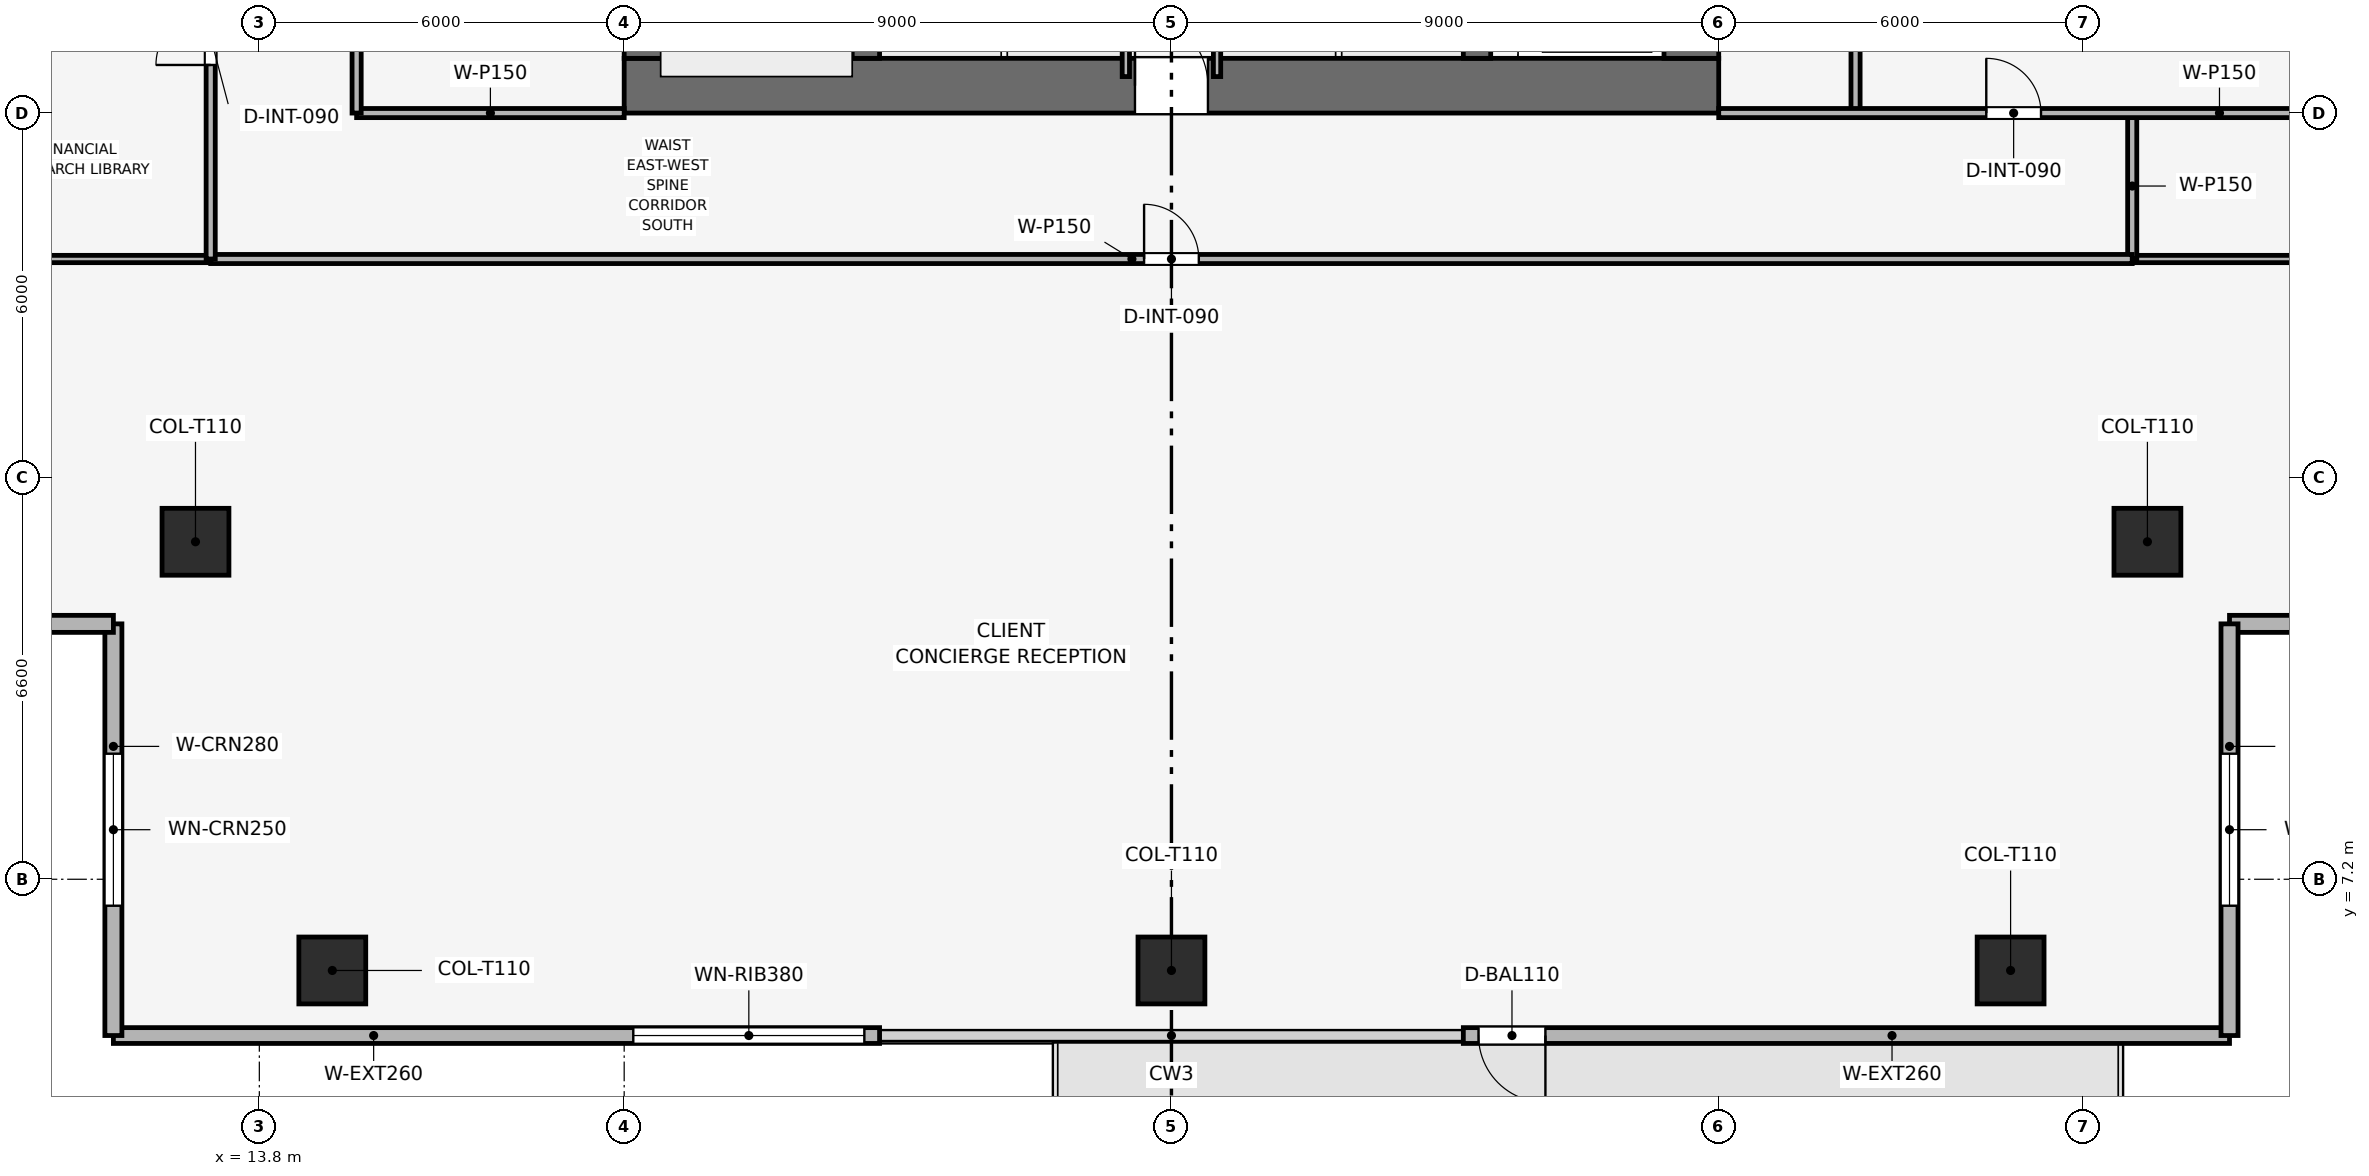
"""IFC4 building model, lengths in metres.
Left out: names, types, materials, properties, quantities, classifications, styles, units other than length and angle.
Written with IfcOpenShell. Run it as: python <this file> out.ifc"""

import sys

from ifc_helpers import new_model, si_unit, direction, frame, frame_2d, origin, origin_2d, place, context, subcontext, project, spatial, rectangle, extrude, element, fill, save


model = new_model("IFC4")
c1 = context("Model", 3, precision=1e-05, world=origin(), true_north=direction((0.0, 1.0)))
c2 = subcontext(c1, "Body", "Model", "MODEL_VIEW")
j1 = project(units=[si_unit("LENGTHUNIT", "METRE"), si_unit("PLANEANGLEUNIT", "RADIAN")], contexts=[c1])
p1 = place(None, origin())
s1 = spatial("IfcSite", under=j1, at=p1, CompositionType="ELEMENT")
p2 = place(p1, origin())
s2 = spatial("IfcBuilding", under=s1, at=p2, CompositionType="ELEMENT")
p3 = place(p2, frame((0.0, 0.0, 153.3)))
s3 = spatial("IfcBuildingStorey", under=s2, at=p3, CompositionType="ELEMENT", Elevation=153.3)
p4 = place(p3, frame((19.8, 20.25, 0.0), z_axis=(0.0, 0.0, 1.0), x_axis=(1.0, 0.0, 0.0)))
e1 = element("IfcWall", 1, at=p4, inside=s3, PredefinedType="SHEAR", context=c2, shape_type="SweptSolid", body=[
    extrude(rectangle(XDim=18.0, YDim=0.9, at=frame_2d((9.0, 0.0))), origin(), (0.0, 0.0, 1.0), 3.75),
])
p5 = place(p4, frame((8.4, 0.0, 0.0)))
e2 = element("IfcOpeningElement", 2, at=p5, cuts=e1, PredefinedType="OPENING", context=c2, shape_type="SweptSolid", body=[
    extrude(rectangle(XDim=1.2, YDim=2.2, at=frame_2d((0.6, 1.1))), frame((0.0, 0.46, 0.0), z_axis=(0.0, -1.0, 0.0), x_axis=(1.0, 0.0, 0.0)), (0.0, 0.0, 1.0), 0.92),
])
p6 = place(p3, frame((20.25, 20.7, 0.0), z_axis=(0.0, 0.0, 1.0), x_axis=(0.0, 1.0, 0.0)))
e3 = element("IfcWall", 3, at=p6, inside=s3, PredefinedType="SHEAR", context=c2, shape_type="SweptSolid", body=[
    extrude(rectangle(XDim=16.2, YDim=0.9, at=frame_2d((8.1, 0.0))), origin(), (0.0, 0.0, 1.0), 3.75),
])
p7 = place(p6, frame((10.1, 0.0, 0.0)))
e4 = element("IfcOpeningElement", 4, at=p7, cuts=e3, PredefinedType="OPENING", context=c2, shape_type="SweptSolid", body=[
    extrude(rectangle(XDim=1.1, YDim=2.15, at=frame_2d((0.55, 1.075))), frame((0.0, 0.46, 0.0), z_axis=(0.0, -1.0, 0.0), x_axis=(1.0, 0.0, 0.0)), (0.0, 0.0, 1.0), 0.92),
])
p8 = place(p3, frame((37.35, 20.7, 0.0), z_axis=(0.0, 0.0, 1.0), x_axis=(0.0, 1.0, 0.0)))
e5 = element("IfcWall", 5, at=p8, inside=s3, PredefinedType="SHEAR", context=c2, shape_type="SweptSolid", body=[
    extrude(rectangle(XDim=16.2, YDim=0.9, at=frame_2d((8.1, 0.0))), origin(), (0.0, 0.0, 1.0), 3.75),
])
p9 = place(p8, frame((4.6, 0.0, 0.0)))
e6 = element("IfcOpeningElement", 6, at=p9, cuts=e5, PredefinedType="OPENING", context=c2, shape_type="SweptSolid", body=[
    extrude(rectangle(XDim=1.1, YDim=2.15, at=frame_2d((0.55, 1.075))), frame((0.0, 0.46, 0.0), z_axis=(0.0, -1.0, 0.0), x_axis=(1.0, 0.0, 0.0)), (0.0, 0.0, 1.0), 0.92),
])
for number, where, z_axis, x_axis in (
    (7, (23.775, 20.7, 0.0), (0.0, 0.0, 1.0), (0.0, 1.0, 0.0)),
    (8, (33.825, 20.7, 0.0), (0.0, 0.0, 1.0), (0.0, 1.0, 0.0)),
):
    element("IfcWall", number, at=place(p3, frame(where, z_axis=z_axis, x_axis=x_axis)), inside=s3, PredefinedType="SHEAR", context=c2, shape_type="SweptSolid", body=[
        extrude(rectangle(XDim=16.2, YDim=0.45, at=frame_2d((8.1, 0.0))), origin(), (0.0, 0.0, 1.0), 3.75),
    ])
for number, where, z_axis, x_axis in (
    (9, (15.0, 5.7, 0.003), (0.0, 0.0, 1.0), (1.0, 0.0, 0.0)),
    (10, (28.8, 5.7, 0.003), (0.0, 0.0, 1.0), (1.0, 0.0, 0.0)),
    (11, (42.6, 5.7, 0.003), (0.0, 0.0, 1.0), (1.0, 0.0, 0.0)),
    (12, (12.75, 12.75, 0.003), (0.0, 0.0, 1.0), (1.0, 0.0, 0.0)),
    (13, (44.85, 12.75, 0.003), (0.0, 0.0, 1.0), (1.0, 0.0, 0.0)),
):
    element("IfcColumn", number, at=place(p3, frame(where, z_axis=z_axis, x_axis=x_axis)), inside=s3, PredefinedType="COLUMN", context=c2, shape_type="SweptSolid", body=[
        extrude(rectangle(XDim=1.1, YDim=1.1, at=origin_2d()), origin(), (0.0, 0.0, 1.0), 3.489),
    ])
p10 = place(p3, frame((46.2, 4.63, 0.0), z_axis=(0.0, 0.0, 1.0), x_axis=(-1.0, 0.0, 0.0)))
e14 = element("IfcWall", 14, at=p10, inside=s3, PredefinedType="SOLIDWALL", context=c2, shape_type="SweptSolid", body=[
    extrude(rectangle(XDim=12.6, YDim=0.26, at=frame_2d((6.3, 0.0))), origin(), (0.0, 0.0, 1.0), 3.495),
])
p11 = place(p10, frame((11.25, 0.0, 0.0)))
e15 = element("IfcOpeningElement", 15, at=p11, cuts=e14, PredefinedType="OPENING", context=c2, shape_type="SweptSolid", body=[
    extrude(rectangle(XDim=1.1, YDim=2.2, at=frame_2d((0.55, 1.1))), frame((0.0, 0.14, 0.0), z_axis=(0.0, -1.0, 0.0), x_axis=(1.0, 0.0, 0.0)), (0.0, 0.0, 1.0), 0.28),
])
p12 = place(p3, frame((24.0, 4.63, 0.0), z_axis=(0.0, 0.0, 1.0), x_axis=(-1.0, 0.0, 0.0)))
e16 = element("IfcWall", 16, at=p12, inside=s3, PredefinedType="SOLIDWALL", context=c2, shape_type="SweptSolid", body=[
    extrude(rectangle(XDim=12.6, YDim=0.26, at=frame_2d((6.3, 0.0))), origin(), (0.0, 0.0, 1.0), 3.495),
])
p13 = place(p12, frame((0.25, 0.0, 0.9)))
e17 = element("IfcOpeningElement", 17, at=p13, cuts=e16, PredefinedType="OPENING", context=c2, shape_type="SweptSolid", body=[
    extrude(rectangle(XDim=3.8, YDim=1.9, at=frame_2d((1.9, 0.95))), frame((0.0, 0.14, 0.0), z_axis=(0.0, -1.0, 0.0), x_axis=(1.0, 0.0, 0.0)), (0.0, 0.0, 1.0), 0.28),
])
p14 = place(p3, frame((11.4, 4.63, 0.0), z_axis=(0.0, 0.0, 1.0), x_axis=(0.0, 1.0, 0.0)))
e18 = element("IfcWall", 18, at=p14, inside=s3, PredefinedType="SOLIDWALL", context=c2, shape_type="SweptSolid", body=[
    extrude(rectangle(XDim=6.77, YDim=0.28, at=frame_2d((3.385, 0.0))), origin(), (0.0, 0.0, 1.0), 3.495),
])
p15 = place(p14, frame((2.135, 0.0, 0.9)))
e19 = element("IfcOpeningElement", 19, at=p15, cuts=e18, PredefinedType="OPENING", context=c2, shape_type="SweptSolid", body=[
    extrude(rectangle(XDim=2.5, YDim=1.9, at=frame_2d((1.25, 0.95))), frame((0.0, 0.15, 0.0), z_axis=(0.0, -1.0, 0.0), x_axis=(1.0, 0.0, 0.0)), (0.0, 0.0, 1.0), 0.3),
])
p16 = place(p3, frame((11.4, 11.4, 0.0), z_axis=(0.0, 0.0, 1.0), x_axis=(-1.0, 0.0, 0.0)))
e20 = element("IfcWall", 20, at=p16, inside=s3, PredefinedType="SOLIDWALL", context=c2, shape_type="SweptSolid", body=[
    extrude(rectangle(XDim=6.77, YDim=0.28, at=frame_2d((3.385, 0.0))), origin(), (0.0, 0.0, 1.0), 3.495),
])
p17 = place(p16, frame((2.135, 0.0, 0.9)))
e21 = element("IfcOpeningElement", 21, at=p17, cuts=e20, PredefinedType="OPENING", context=c2, shape_type="SweptSolid", body=[
    extrude(rectangle(XDim=2.5, YDim=1.9, at=frame_2d((1.25, 0.95))), frame((0.0, 0.15, 0.0), z_axis=(0.0, -1.0, 0.0), x_axis=(1.0, 0.0, 0.0)), (0.0, 0.0, 1.0), 0.3),
])
p18 = place(p3, frame((52.97, 11.4, 0.0), z_axis=(0.0, 0.0, 1.0), x_axis=(-1.0, 0.0, 0.0)))
e22 = element("IfcWall", 22, at=p18, inside=s3, PredefinedType="SOLIDWALL", context=c2, shape_type="SweptSolid", body=[
    extrude(rectangle(XDim=6.77, YDim=0.28, at=frame_2d((3.385, 0.0))), origin(), (0.0, 0.0, 1.0), 3.495),
])
p19 = place(p18, frame((2.135, 0.0, 0.9)))
e23 = element("IfcOpeningElement", 23, at=p19, cuts=e22, PredefinedType="OPENING", context=c2, shape_type="SweptSolid", body=[
    extrude(rectangle(XDim=2.5, YDim=1.9, at=frame_2d((1.25, 0.95))), frame((0.0, 0.15, 0.0), z_axis=(0.0, -1.0, 0.0), x_axis=(1.0, 0.0, 0.0)), (0.0, 0.0, 1.0), 0.3),
])
p20 = place(p3, frame((46.2, 11.4, 0.0), z_axis=(0.0, 0.0, 1.0), x_axis=(0.0, -1.0, 0.0)))
e24 = element("IfcWall", 24, at=p20, inside=s3, PredefinedType="SOLIDWALL", context=c2, shape_type="SweptSolid", body=[
    extrude(rectangle(XDim=6.77, YDim=0.28, at=frame_2d((3.385, 0.0))), origin(), (0.0, 0.0, 1.0), 3.495),
])
p21 = place(p20, frame((2.135, 0.0, 0.9)))
e25 = element("IfcOpeningElement", 25, at=p21, cuts=e24, PredefinedType="OPENING", context=c2, shape_type="SweptSolid", body=[
    extrude(rectangle(XDim=2.5, YDim=1.9, at=frame_2d((1.25, 0.95))), frame((0.0, 0.15, 0.0), z_axis=(0.0, -1.0, 0.0), x_axis=(1.0, 0.0, 0.0)), (0.0, 0.0, 1.0), 0.3),
])
for number, where, z_axis, x_axis in (
    (26, (28.05, 20.4, 0.0), (0.0, 0.0, 1.0), (0.0, 1.0, 0.0)),
    (27, (29.55, 20.4, 0.0), (0.0, 0.0, 1.0), (0.0, 1.0, 0.0)),
):
    element("IfcWall", number, at=place(p3, frame(where, z_axis=z_axis, x_axis=x_axis)), inside=s3, PredefinedType="PARTITIONING", context=c2, shape_type="SweptSolid", body=[
        extrude(rectangle(XDim=2.75, YDim=0.12, at=frame_2d((1.375, 0.0))), origin(), (0.0, 0.0, 1.0), 3.495),
    ])
p22 = place(p3, frame((15.4, 19.8, 0.0), z_axis=(0.0, 0.0, 1.0), x_axis=(1.0, 0.0, 0.0)))
e28 = element("IfcWall", 28, at=p22, inside=s3, PredefinedType="PARTITIONING", context=c2, shape_type="SweptSolid", body=[
    extrude(rectangle(XDim=4.4, YDim=0.15, at=frame_2d((2.2, 0.0))), origin(), (0.0, 0.0, 1.0), 3.03),
])
p23 = place(p3, frame((15.4, 19.8, 0.0), z_axis=(0.0, 0.0, 1.0), x_axis=(0.0, 1.0, 0.0)))
e29 = element("IfcWall", 29, at=p23, inside=s3, PredefinedType="PARTITIONING", context=c2, shape_type="SweptSolid", body=[
    extrude(rectangle(XDim=10.35, YDim=0.15, at=frame_2d((5.175, 0.0))), origin(), (0.0, 0.0, 1.0), 3.03),
])
p24 = place(p23, frame((1.2, 0.0, 0.0)))
e30 = element("IfcOpeningElement", 30, at=p24, cuts=e29, PredefinedType="OPENING", context=c2, shape_type="SweptSolid", body=[
    extrude(rectangle(XDim=0.9, YDim=2.1, at=frame_2d((0.45, 1.05))), frame((0.0, 0.085, 0.0), z_axis=(0.0, -1.0, 0.0), x_axis=(1.0, 0.0, 0.0)), (0.0, 0.0, 1.0), 0.17),
])
p25 = place(p23, frame((4.7, 0.0, 0.0)))
e31 = element("IfcOpeningElement", 31, at=p25, cuts=e29, PredefinedType="OPENING", context=c2, shape_type="SweptSolid", body=[
    extrude(rectangle(XDim=0.9, YDim=2.1, at=frame_2d((0.45, 1.05))), frame((0.0, 0.085, 0.0), z_axis=(0.0, -1.0, 0.0), x_axis=(1.0, 0.0, 0.0)), (0.0, 0.0, 1.0), 0.17),
])
p26 = place(p23, frame((8.1, 0.0, 0.0)))
e32 = element("IfcOpeningElement", 32, at=p26, cuts=e29, PredefinedType="OPENING", context=c2, shape_type="SweptSolid", body=[
    extrude(rectangle(XDim=0.95, YDim=2.1, at=frame_2d((0.475, 1.05))), frame((0.0, 0.085, 0.0), z_axis=(0.0, -1.0, 0.0), x_axis=(1.0, 0.0, 0.0)), (0.0, 0.0, 1.0), 0.17),
])
p27 = place(p3, frame((40.05, 19.8, 0.0), z_axis=(0.0, 0.0, 1.0), x_axis=(0.0, 1.0, 0.0)))
e33 = element("IfcWall", 33, at=p27, inside=s3, PredefinedType="PARTITIONING", context=c2, shape_type="SweptSolid", body=[
    extrude(rectangle(XDim=7.05, YDim=0.15, at=frame_2d((3.525, 0.0))), origin(), (0.0, 0.0, 1.0), 3.03),
])
p28 = place(p3, frame((4.63, 17.4, 0.0), z_axis=(0.0, 0.0, 1.0), x_axis=(1.0, 0.0, 0.0)))
e34 = element("IfcWall", 34, at=p28, inside=s3, PredefinedType="PARTITIONING", context=c2, shape_type="SweptSolid", body=[
    extrude(rectangle(XDim=8.37, YDim=0.12, at=frame_2d((4.185, 0.0))), origin(), (0.0, 0.0, 1.0), 2.98),
])
p29 = place(p3, frame((44.6, 17.4, 0.0), z_axis=(0.0, 0.0, 1.0), x_axis=(1.0, 0.0, 0.0)))
e35 = element("IfcWall", 35, at=p29, inside=s3, PredefinedType="PARTITIONING", context=c2, shape_type="SweptSolid", body=[
    extrude(rectangle(XDim=8.37, YDim=0.12, at=frame_2d((4.185, 0.0))), origin(), (0.0, 0.0, 1.0), 2.98),
])
p30 = place(p3, frame((44.6, 17.4, 0.0), z_axis=(0.0, 0.0, 1.0), x_axis=(0.0, 1.0, 0.0)))
e36 = element("IfcWall", 36, at=p30, inside=s3, PredefinedType="PARTITIONING", context=c2, shape_type="SweptSolid", body=[
    extrude(rectangle(XDim=2.4, YDim=0.15, at=frame_2d((1.2, 0.0))), origin(), (0.0, 0.0, 1.0), 3.495),
])
p31 = place(p3, frame((37.8, 19.8, 0.0), z_axis=(0.0, 0.0, 1.0), x_axis=(1.0, 0.0, 0.0)))
e37 = element("IfcWall", 37, at=p31, inside=s3, PredefinedType="PARTITIONING", context=c2, shape_type="SweptSolid", body=[
    extrude(rectangle(XDim=15.17, YDim=0.15, at=frame_2d((7.585, 0.0))), origin(), (0.0, 0.0, 1.0), 2.98),
])
p32 = place(p31, frame((4.4, 0.0, 0.0)))
e38 = element("IfcOpeningElement", 38, at=p32, cuts=e37, PredefinedType="OPENING", context=c2, shape_type="SweptSolid", body=[
    extrude(rectangle(XDim=0.9, YDim=2.1, at=frame_2d((0.45, 1.05))), frame((0.0, 0.085, 0.0), z_axis=(0.0, -1.0, 0.0), x_axis=(1.0, 0.0, 0.0)), (0.0, 0.0, 1.0), 0.17),
])
p33 = place(p3, frame((13.0, 17.4, 0.0), z_axis=(0.0, 0.0, 1.0), x_axis=(1.0, 0.0, 0.0)))
e39 = element("IfcWall", 39, at=p33, inside=s3, PredefinedType="PARTITIONING", context=c2, shape_type="SweptSolid", body=[
    extrude(rectangle(XDim=31.6, YDim=0.15, at=frame_2d((15.8, 0.0))), origin(), (0.0, 0.0, 1.0), 3.03),
])
p34 = place(p33, frame((15.35, 0.0, 0.0)))
e40 = element("IfcOpeningElement", 40, at=p34, cuts=e39, PredefinedType="OPENING", context=c2, shape_type="SweptSolid", body=[
    extrude(rectangle(XDim=0.9, YDim=2.1, at=frame_2d((0.45, 1.05))), frame((0.0, 0.085, 0.0), z_axis=(0.0, -1.0, 0.0), x_axis=(1.0, 0.0, 0.0)), (0.0, 0.0, 1.0), 0.17),
])
p35 = place(p3, frame((13.0, 17.4, 0.0), z_axis=(0.0, 0.0, 1.0), x_axis=(0.0, 1.0, 0.0)))
e41 = element("IfcWall", 41, at=p35, inside=s3, PredefinedType="PARTITIONING", context=c2, shape_type="SweptSolid", body=[
    extrude(rectangle(XDim=22.8, YDim=0.15, at=frame_2d((11.4, 0.0))), origin(), (0.0, 0.0, 1.0), 3.03),
])
p36 = place(p35, frame((3.191, 0.0, 0.0)))
e42 = element("IfcOpeningElement", 42, at=p36, cuts=e41, PredefinedType="OPENING", context=c2, shape_type="SweptSolid", body=[
    extrude(rectangle(XDim=0.9, YDim=2.1, at=frame_2d((0.45, 1.05))), frame((0.0, 0.085, 0.0), z_axis=(0.0, -1.0, 0.0), x_axis=(1.0, 0.0, 0.0)), (0.0, 0.0, 1.0), 0.17),
])
p37 = place(p35, frame((6.581, 0.0, 0.0)))
e43 = element("IfcOpeningElement", 43, at=p37, cuts=e41, PredefinedType="OPENING", context=c2, shape_type="SweptSolid", body=[
    extrude(rectangle(XDim=0.9, YDim=2.1, at=frame_2d((0.45, 1.05))), frame((0.0, 0.085, 0.0), z_axis=(0.0, -1.0, 0.0), x_axis=(1.0, 0.0, 0.0)), (0.0, 0.0, 1.0), 0.17),
])
p38 = place(p35, frame((10.878, 0.0, 0.0)))
e44 = element("IfcOpeningElement", 44, at=p38, cuts=e41, PredefinedType="OPENING", context=c2, shape_type="SweptSolid", body=[
    extrude(rectangle(XDim=0.9, YDim=2.1, at=frame_2d((0.45, 1.05))), frame((0.0, 0.085, 0.0), z_axis=(0.0, -1.0, 0.0), x_axis=(1.0, 0.0, 0.0)), (0.0, 0.0, 1.0), 0.17),
])
p39 = place(p35, frame((16.488, 0.0, 0.0)))
e45 = element("IfcOpeningElement", 45, at=p39, cuts=e41, PredefinedType="OPENING", context=c2, shape_type="SweptSolid", body=[
    extrude(rectangle(XDim=0.9, YDim=2.1, at=frame_2d((0.45, 1.05))), frame((0.0, 0.085, 0.0), z_axis=(0.0, -1.0, 0.0), x_axis=(1.0, 0.0, 0.0)), (0.0, 0.0, 1.0), 0.17),
])
p40 = place(p11, origin())
e46 = element("IfcDoor", 46, at=p40, inside=s3, OperationType="SINGLE_SWING_LEFT", PredefinedType="DOOR", context=c2, shape_type="SweptSolid", body=[
    extrude(rectangle(XDim=1.1, YDim=2.2, at=frame_2d((0.55, 1.1))), frame((0.0, 0.025, 0.0), z_axis=(0.0, -1.0, 0.0), x_axis=(1.0, 0.0, 0.0)), (0.0, 0.0, 1.0), 0.05),
])
fill(e15, e46)
p41 = place(p13, origin())
e47 = element("IfcWindow", 47, at=p41, inside=s3, PartitioningType="SINGLE_PANEL", PredefinedType="WINDOW", context=c2, shape_type="SweptSolid", body=[
    extrude(rectangle(XDim=3.8, YDim=1.9, at=frame_2d((1.9, 0.95))), frame((0.0, 0.03, 0.0), z_axis=(0.0, -1.0, 0.0), x_axis=(1.0, 0.0, 0.0)), (0.0, 0.0, 1.0), 0.06),
])
fill(e17, e47)
p42 = place(p15, origin())
e48 = element("IfcWindow", 48, at=p42, inside=s3, PartitioningType="SINGLE_PANEL", PredefinedType="WINDOW", context=c2, shape_type="SweptSolid", body=[
    extrude(rectangle(XDim=2.5, YDim=1.9, at=frame_2d((1.25, 0.95))), frame((0.0, 0.03, 0.0), z_axis=(0.0, -1.0, 0.0), x_axis=(1.0, 0.0, 0.0)), (0.0, 0.0, 1.0), 0.06),
])
fill(e19, e48)
p43 = place(p21, origin())
e49 = element("IfcWindow", 49, at=p43, inside=s3, PartitioningType="SINGLE_PANEL", PredefinedType="WINDOW", context=c2, shape_type="SweptSolid", body=[
    extrude(rectangle(XDim=2.5, YDim=1.9, at=frame_2d((1.25, 0.95))), frame((0.0, 0.03, 0.0), z_axis=(0.0, -1.0, 0.0), x_axis=(1.0, 0.0, 0.0)), (0.0, 0.0, 1.0), 0.06),
])
fill(e25, e49)
p44 = place(p32, origin())
e50 = element("IfcDoor", 50, at=p44, inside=s3, OperationType="SINGLE_SWING_LEFT", PredefinedType="DOOR", context=c2, shape_type="SweptSolid", body=[
    extrude(rectangle(XDim=0.9, YDim=2.1, at=frame_2d((0.45, 1.05))), frame((0.0, 0.025, 0.0), z_axis=(0.0, -1.0, 0.0), x_axis=(1.0, 0.0, 0.0)), (0.0, 0.0, 1.0), 0.05),
])
fill(e38, e50)
p45 = place(p34, origin())
e51 = element("IfcDoor", 51, at=p45, inside=s3, OperationType="SINGLE_SWING_LEFT", PredefinedType="DOOR", context=c2, shape_type="SweptSolid", body=[
    extrude(rectangle(XDim=0.9, YDim=2.1, at=frame_2d((0.45, 1.05))), frame((0.0, 0.025, 0.0), z_axis=(0.0, -1.0, 0.0), x_axis=(1.0, 0.0, 0.0)), (0.0, 0.0, 1.0), 0.05),
])
fill(e40, e51)
p46 = place(p36, origin())
e52 = element("IfcDoor", 52, at=p46, inside=s3, OperationType="SINGLE_SWING_LEFT", PredefinedType="DOOR", context=c2, shape_type="SweptSolid", body=[
    extrude(rectangle(XDim=0.9, YDim=2.1, at=frame_2d((0.45, 1.05))), frame((0.0, 0.025, 0.0), z_axis=(0.0, -1.0, 0.0), x_axis=(1.0, 0.0, 0.0)), (0.0, 0.0, 1.0), 0.05),
])
fill(e42, e52)
p47 = place(p5, origin())
e53 = element("IfcDoor", 53, at=p47, inside=s3, OperationType="SINGLE_SWING_LEFT", PredefinedType="DOOR", context=c2, shape_type="SweptSolid", body=[
    extrude(rectangle(XDim=1.2, YDim=2.2, at=frame_2d((0.6, 1.1))), frame((0.0, 0.025, 0.0), z_axis=(0.0, -1.0, 0.0), x_axis=(1.0, 0.0, 0.0)), (0.0, 0.0, 1.0), 0.05),
])
fill(e2, e53)
save(model, sys.argv[1])
